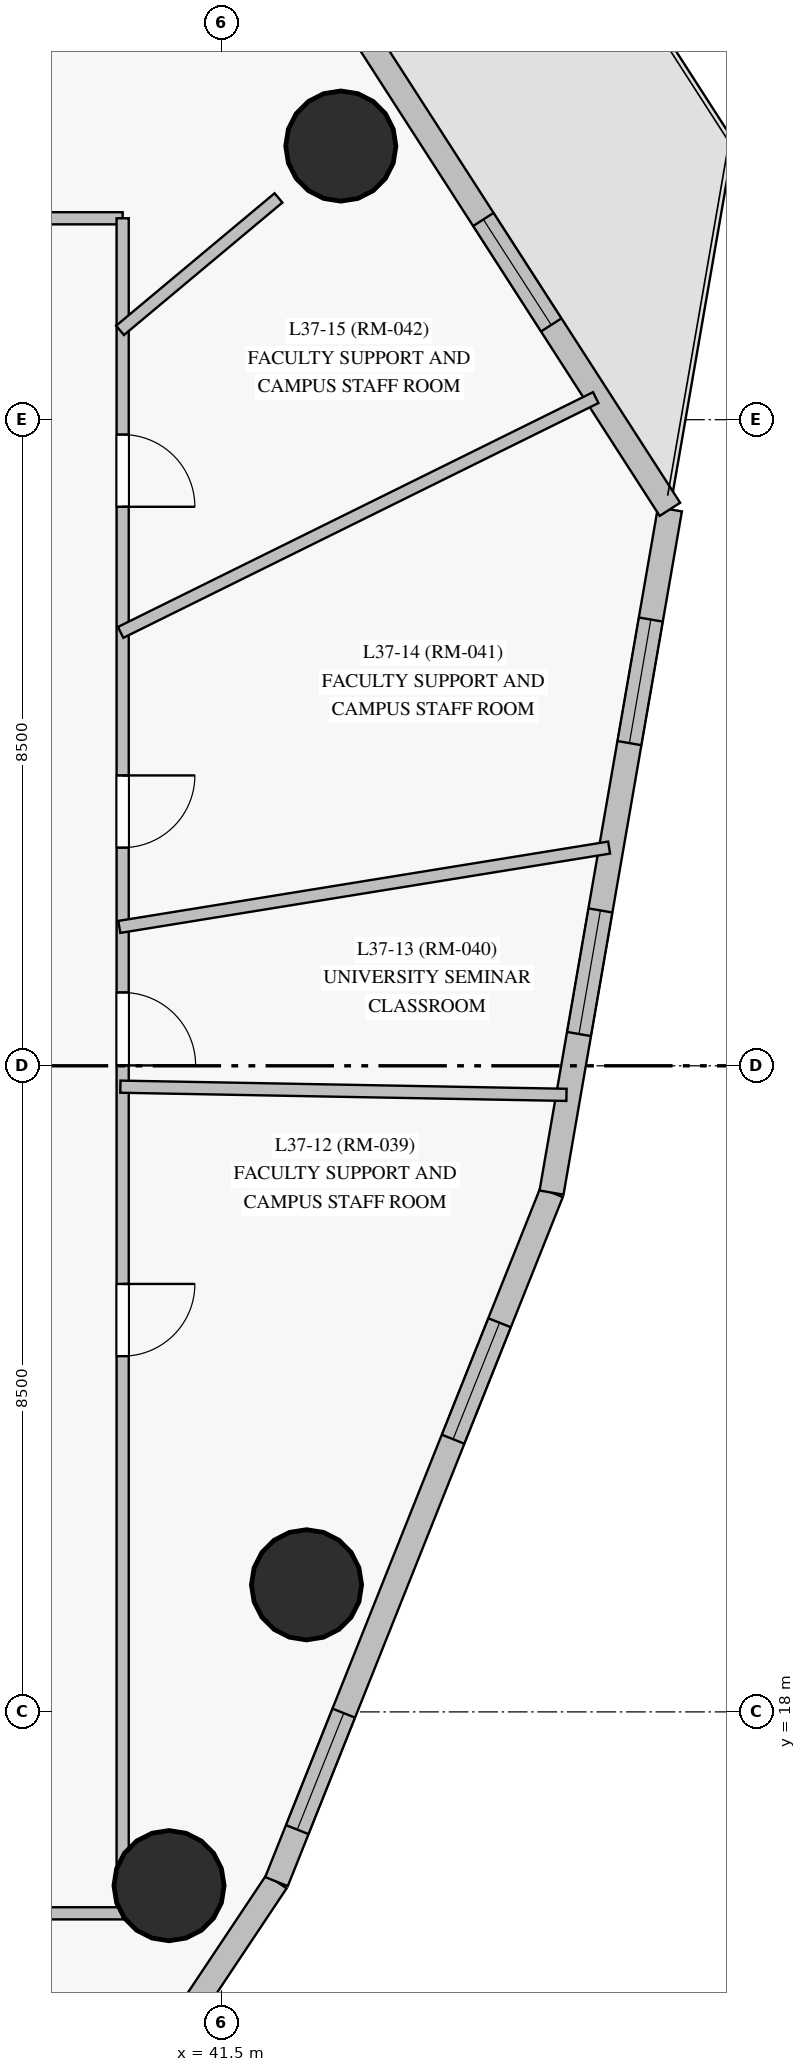
"""IFC4 building model, lengths in metres.
Left out: names, types, materials, properties, quantities, classifications, styles, units other than length and angle.
Written with IfcOpenShell. Run it as: python <this file> out.ifc"""

import sys

from ifc_helpers import new_model, si_unit, direction, frame, frame_2d, origin, origin_with_axes, origin_2d, place, context, subcontext, project, spatial, rectangle, circle, extrude, source, transform, mapped, element, fill, save


model = new_model("IFC4")
c1 = context("Model", 3, precision=1e-05, world=origin(), true_north=direction((0.0, 1.0)))
c2 = subcontext(c1, "Body", "Model", "MODEL_VIEW")
j1 = project(units=[si_unit("LENGTHUNIT", "METRE"), si_unit("PLANEANGLEUNIT", "RADIAN")], contexts=[c1])
p1 = place(None, origin())
s1 = spatial("IfcSite", under=j1, at=p1, CompositionType="ELEMENT")
p2 = place(p1, origin())
s2 = spatial("IfcBuilding", under=s1, at=p2, CompositionType="ELEMENT")
p3 = place(p2, frame((0.0, 0.0, 132.8)))
s3 = spatial("IfcBuildingStorey", under=s2, at=p3, CompositionType="ELEMENT", Elevation=132.8)
m1 = source(origin_with_axes(), c2, "Body", "SweptSolid", [
    extrude(circle(Radius=0.725, at=origin_2d()), origin(), (0.0, 0.0, 1.0), 3.05),
])
for number, where, z_axis, x_axis in (
    (1, (42.619, 19.672, 0.0), (0.0, 0.0, 1.0), (1.0, 0.0, 0.0)),
    (2, (43.07, 38.6, 0.0), (0.0, 0.0, 1.0), (1.0, 0.0, 0.0)),
    (3, (40.81, 15.714, 0.0), (0.0, 0.0, 1.0), (1.0, 0.0, 0.0)),
):
    element("IfcColumn", number, at=place(p3, frame(where, z_axis=z_axis, x_axis=x_axis)), inside=s3, PredefinedType="COLUMN", context=c2, shape_type="MappedRepresentation", body=[
        mapped(m1, transform((0.0, 0.0, 0.0), scale=1.0)),
    ])
p4 = place(p3, frame((34.435, 4.083, 0.0), z_axis=(0.0, 0.0, 1.0), x_axis=(0.554696184095, 0.832052969077, 0.0)))
e4 = element("IfcWall", 4, at=p4, inside=s3, PredefinedType="SOLIDWALL", context=c2, shape_type="SweptSolid", body=[
    extrude(rectangle(XDim=14.042, YDim=0.32, at=frame_2d((7.021, 0.0))), origin(), (0.0, 0.0, 1.0), 2.825),
])
p5 = place(p4, frame((0.599, 0.0, 0.85)))
e5 = element("IfcOpeningElement", 5, at=p5, cuts=e4, PredefinedType="OPENING", context=c2, shape_type="SweptSolid", body=[
    extrude(rectangle(XDim=1.65, YDim=1.65, at=frame_2d((0.825, 0.825))), frame((0.0, 0.17, 0.0), z_axis=(0.0, -1.0, 0.0), x_axis=(1.0, 0.0, 0.0)), (0.0, 0.0, 1.0), 0.34),
])
p6 = place(p4, frame((3.502, 0.0, 0.85)))
e6 = element("IfcOpeningElement", 6, at=p6, cuts=e4, PredefinedType="OPENING", context=c2, shape_type="SweptSolid", body=[
    extrude(rectangle(XDim=1.65, YDim=1.65, at=frame_2d((0.825, 0.825))), frame((0.0, 0.17, 0.0), z_axis=(0.0, -1.0, 0.0), x_axis=(1.0, 0.0, 0.0)), (0.0, 0.0, 1.0), 0.34),
])
p7 = place(p4, frame((8.36, 0.0, 0.85)))
e7 = element("IfcOpeningElement", 7, at=p7, cuts=e4, PredefinedType="OPENING", context=c2, shape_type="SweptSolid", body=[
    extrude(rectangle(XDim=1.65, YDim=1.65, at=frame_2d((0.825, 0.825))), frame((0.0, 0.17, 0.0), z_axis=(0.0, -1.0, 0.0), x_axis=(1.0, 0.0, 0.0)), (0.0, 0.0, 1.0), 0.34),
])
p8 = place(p3, frame((42.224, 15.767, 0.0), z_axis=(0.0, 0.0, 1.0), x_axis=(0.37072212122, 0.928743833809, 0.0)))
e8 = element("IfcWall", 8, at=p8, inside=s3, PredefinedType="SOLIDWALL", context=c2, shape_type="SweptSolid", body=[
    extrude(rectangle(XDim=9.76, YDim=0.32, at=frame_2d((4.88, 0.0))), origin(), (0.0, 0.0, 1.0), 2.825),
])
p9 = place(p8, frame((0.737, 0.0, 0.85)))
e9 = element("IfcOpeningElement", 9, at=p9, cuts=e8, PredefinedType="OPENING", context=c2, shape_type="SweptSolid", body=[
    extrude(rectangle(XDim=1.65, YDim=1.65, at=frame_2d((0.825, 0.825))), frame((0.0, 0.17, 0.0), z_axis=(0.0, -1.0, 0.0), x_axis=(1.0, 0.0, 0.0)), (0.0, 0.0, 1.0), 0.34),
])
p10 = place(p8, frame((6.267, 0.0, 0.85)))
e10 = element("IfcOpeningElement", 10, at=p10, cuts=e8, PredefinedType="OPENING", context=c2, shape_type="SweptSolid", body=[
    extrude(rectangle(XDim=1.65, YDim=1.65, at=frame_2d((0.825, 0.825))), frame((0.0, 0.17, 0.0), z_axis=(0.0, -1.0, 0.0), x_axis=(1.0, 0.0, 0.0)), (0.0, 0.0, 1.0), 0.34),
])
p11 = place(p3, frame((45.842, 24.832, 0.0), z_axis=(0.0, 0.0, 1.0), x_axis=(0.170718823462, 0.985319787336, 0.0)))
e11 = element("IfcWall", 11, at=p11, inside=s3, PredefinedType="SOLIDWALL", context=c2, shape_type="SweptSolid", body=[
    extrude(rectangle(XDim=9.123, YDim=0.32, at=frame_2d((4.561, 0.0))), origin(), (0.0, 0.0, 1.0), 2.825),
])
p12 = place(p11, frame((2.117, 0.0, 0.85)))
e12 = element("IfcOpeningElement", 12, at=p12, cuts=e11, PredefinedType="OPENING", context=c2, shape_type="SweptSolid", body=[
    extrude(rectangle(XDim=1.65, YDim=1.65, at=frame_2d((0.825, 0.825))), frame((0.0, 0.17, 0.0), z_axis=(0.0, -1.0, 0.0), x_axis=(1.0, 0.0, 0.0)), (0.0, 0.0, 1.0), 0.34),
])
p13 = place(p11, frame((6.001, 0.0, 0.85)))
e13 = element("IfcOpeningElement", 13, at=p13, cuts=e11, PredefinedType="OPENING", context=c2, shape_type="SweptSolid", body=[
    extrude(rectangle(XDim=1.65, YDim=1.65, at=frame_2d((0.825, 0.825))), frame((0.0, 0.17, 0.0), z_axis=(0.0, -1.0, 0.0), x_axis=(1.0, 0.0, 0.0)), (0.0, 0.0, 1.0), 0.34),
])
p14 = place(p3, frame((47.4, 33.821, 0.0), z_axis=(0.0, 0.0, 1.0), x_axis=(-0.541180462956, 0.840906479054, 0.0)))
e14 = element("IfcWall", 14, at=p14, inside=s3, PredefinedType="SOLIDWALL", context=c2, shape_type="SweptSolid", body=[
    extrude(rectangle(XDim=16.776, YDim=0.32, at=frame_2d((8.388, 0.0))), origin(), (0.0, 0.0, 1.0), 2.825),
])
p15 = place(p14, frame((2.885, 0.0, 0.85)))
e15 = element("IfcOpeningElement", 15, at=p15, cuts=e14, PredefinedType="OPENING", context=c2, shape_type="SweptSolid", body=[
    extrude(rectangle(XDim=1.65, YDim=1.65, at=frame_2d((0.825, 0.825))), frame((0.0, 0.17, 0.0), z_axis=(0.0, -1.0, 0.0), x_axis=(1.0, 0.0, 0.0)), (0.0, 0.0, 1.0), 0.34),
])
p16 = place(p14, frame((14.756, 0.0, 0.85)))
e16 = element("IfcOpeningElement", 16, at=p16, cuts=e14, PredefinedType="OPENING", context=c2, shape_type="SweptSolid", body=[
    extrude(rectangle(XDim=1.4, YDim=1.65, at=frame_2d((0.7, 0.825))), frame((0.0, 0.17, 0.0), z_axis=(0.0, -1.0, 0.0), x_axis=(1.0, 0.0, 0.0)), (0.0, 0.0, 1.0), 0.34),
])
p17 = place(p14, frame((10.659, 0.0, 0.0)))
e17 = element("IfcOpeningElement", 17, at=p17, cuts=e14, PredefinedType="OPENING", context=c2, shape_type="SweptSolid", body=[
    extrude(rectangle(XDim=1.05, YDim=2.12, at=frame_2d((0.525, 1.06))), frame((0.0, 0.17, 0.0), z_axis=(0.0, -1.0, 0.0), x_axis=(1.0, 0.0, 0.0)), (0.0, 0.0, 1.0), 0.34),
])
p18 = place(p3, frame((16.7, 37.65, 0.0), z_axis=(0.0, 0.0, 1.0), x_axis=(1.0, 0.0, 0.0)))
e18 = element("IfcWall", 18, at=p18, inside=s3, PredefinedType="PARTITIONING", context=c2, shape_type="SweptSolid", body=[
    extrude(rectangle(XDim=23.5, YDim=0.16, at=frame_2d((11.75, 0.0))), origin(), (0.0, 0.0, 1.0), 2.325),
])
p19 = place(p18, frame((20.49, 0.0, 0.0)))
e19 = element("IfcOpeningElement", 19, at=p19, cuts=e18, PredefinedType="OPENING", context=c2, shape_type="SweptSolid", body=[
    extrude(rectangle(XDim=0.96, YDim=2.15, at=frame_2d((0.48, 1.075))), frame((0.0, 0.09, 0.0), z_axis=(0.0, -1.0, 0.0), x_axis=(1.0, 0.0, 0.0)), (0.0, 0.0, 1.0), 0.18),
])
p20 = place(p18, frame((17.11, 0.0, 0.0)))
e20 = element("IfcOpeningElement", 20, at=p20, cuts=e18, PredefinedType="OPENING", context=c2, shape_type="SweptSolid", body=[
    extrude(rectangle(XDim=0.95, YDim=2.15, at=frame_2d((0.475, 1.075))), frame((0.0, 0.09, 0.0), z_axis=(0.0, -1.0, 0.0), x_axis=(1.0, 0.0, 0.0)), (0.0, 0.0, 1.0), 0.18),
])
p21 = place(p18, frame((14.71, 0.0, 0.0)))
e21 = element("IfcOpeningElement", 21, at=p21, cuts=e18, PredefinedType="OPENING", context=c2, shape_type="SweptSolid", body=[
    extrude(rectangle(XDim=0.96, YDim=2.15, at=frame_2d((0.48, 1.075))), frame((0.0, 0.09, 0.0), z_axis=(0.0, -1.0, 0.0), x_axis=(1.0, 0.0, 0.0)), (0.0, 0.0, 1.0), 0.18),
])
p22 = place(p18, frame((10.785, 0.0, 0.0)))
e22 = element("IfcOpeningElement", 22, at=p22, cuts=e18, PredefinedType="OPENING", context=c2, shape_type="SweptSolid", body=[
    extrude(rectangle(XDim=0.95, YDim=2.15, at=frame_2d((0.475, 1.075))), frame((0.0, 0.09, 0.0), z_axis=(0.0, -1.0, 0.0), x_axis=(1.0, 0.0, 0.0)), (0.0, 0.0, 1.0), 0.18),
])
p23 = place(p18, frame((7.75, 0.0, 0.0)))
e23 = element("IfcOpeningElement", 23, at=p23, cuts=e18, PredefinedType="OPENING", context=c2, shape_type="SweptSolid", body=[
    extrude(rectangle(XDim=0.95, YDim=2.15, at=frame_2d((0.475, 1.075))), frame((0.0, 0.09, 0.0), z_axis=(0.0, -1.0, 0.0), x_axis=(1.0, 0.0, 0.0)), (0.0, 0.0, 1.0), 0.18),
])
p24 = place(p3, frame((40.2, 37.65, 0.0), z_axis=(0.0, 0.0, 1.0), x_axis=(0.0, -1.0, 0.0)))
e24 = element("IfcWall", 24, at=p24, inside=s3, PredefinedType="PARTITIONING", context=c2, shape_type="SweptSolid", body=[
    extrude(rectangle(XDim=22.3, YDim=0.16, at=frame_2d((11.15, 0.0))), origin(), (0.0, 0.0, 1.0), 2.325),
])
p25 = place(p24, frame((14.02, 0.0, 0.0)))
e25 = element("IfcOpeningElement", 25, at=p25, cuts=e24, PredefinedType="OPENING", context=c2, shape_type="SweptSolid", body=[
    extrude(rectangle(XDim=0.95, YDim=2.15, at=frame_2d((0.475, 1.075))), frame((0.0, 0.09, 0.0), z_axis=(0.0, -1.0, 0.0), x_axis=(1.0, 0.0, 0.0)), (0.0, 0.0, 1.0), 0.18),
])
p26 = place(p24, frame((10.185, 0.0, 0.0)))
e26 = element("IfcOpeningElement", 26, at=p26, cuts=e24, PredefinedType="OPENING", context=c2, shape_type="SweptSolid", body=[
    extrude(rectangle(XDim=0.96, YDim=2.15, at=frame_2d((0.48, 1.075))), frame((0.0, 0.09, 0.0), z_axis=(0.0, -1.0, 0.0), x_axis=(1.0, 0.0, 0.0)), (0.0, 0.0, 1.0), 0.18),
])
p27 = place(p24, frame((7.33, 0.0, 0.0)))
e27 = element("IfcOpeningElement", 27, at=p27, cuts=e24, PredefinedType="OPENING", context=c2, shape_type="SweptSolid", body=[
    extrude(rectangle(XDim=0.95, YDim=2.15, at=frame_2d((0.475, 1.075))), frame((0.0, 0.09, 0.0), z_axis=(0.0, -1.0, 0.0), x_axis=(1.0, 0.0, 0.0)), (0.0, 0.0, 1.0), 0.18),
])
p28 = place(p24, frame((2.846, 0.0, 0.0)))
e28 = element("IfcOpeningElement", 28, at=p28, cuts=e24, PredefinedType="OPENING", context=c2, shape_type="SweptSolid", body=[
    extrude(rectangle(XDim=0.95, YDim=2.15, at=frame_2d((0.475, 1.075))), frame((0.0, 0.09, 0.0), z_axis=(0.0, -1.0, 0.0), x_axis=(1.0, 0.0, 0.0)), (0.0, 0.0, 1.0), 0.18),
])
p29 = place(p3, frame((40.2, 15.35, 0.0), z_axis=(0.0, 0.0, 1.0), x_axis=(-1.0, 0.0, 0.0)))
e29 = element("IfcWall", 29, at=p29, inside=s3, PredefinedType="PARTITIONING", context=c2, shape_type="SweptSolid", body=[
    extrude(rectangle(XDim=10.65, YDim=0.16, at=frame_2d((5.325, 0.0))), origin(), (0.0, 0.0, 1.0), 2.225),
])
p30 = place(p29, frame((7.853, 0.0, 0.0)))
e30 = element("IfcOpeningElement", 30, at=p30, cuts=e29, PredefinedType="OPENING", context=c2, shape_type="SweptSolid", body=[
    extrude(rectangle(XDim=0.95, YDim=2.15, at=frame_2d((0.475, 1.075))), frame((0.0, 0.09, 0.0), z_axis=(0.0, -1.0, 0.0), x_axis=(1.0, 0.0, 0.0)), (0.0, 0.0, 1.0), 0.18),
])
p31 = place(p29, frame((6.308, 0.0, 0.0)))
e31 = element("IfcOpeningElement", 31, at=p31, cuts=e29, PredefinedType="OPENING", context=c2, shape_type="SweptSolid", body=[
    extrude(rectangle(XDim=0.96, YDim=2.15, at=frame_2d((0.48, 1.075))), frame((0.0, 0.09, 0.0), z_axis=(0.0, -1.0, 0.0), x_axis=(1.0, 0.0, 0.0)), (0.0, 0.0, 1.0), 0.18),
])
p32 = place(p29, frame((4.46, 0.0, 0.0)))
e32 = element("IfcOpeningElement", 32, at=p32, cuts=e29, PredefinedType="OPENING", context=c2, shape_type="SweptSolid", body=[
    extrude(rectangle(XDim=0.95, YDim=2.15, at=frame_2d((0.475, 1.075))), frame((0.0, 0.09, 0.0), z_axis=(0.0, -1.0, 0.0), x_axis=(1.0, 0.0, 0.0)), (0.0, 0.0, 1.0), 0.18),
])
p33 = place(p3, frame((34.982, 37.611, 0.0), z_axis=(0.0, 0.0, 1.0), x_axis=(0.499853576741, 0.86610992479, 0.0)))
e33 = element("IfcWall", 33, at=p33, inside=s3, PredefinedType="PARTITIONING", context=c2, shape_type="SweptSolid", body=[
    extrude(rectangle(XDim=9.402, YDim=0.16, at=frame_2d((4.701, 0.0))), origin(), (0.0, 0.0, 1.0), 2.825),
])
p34 = place(p3, frame((40.173, 32.202, 0.0), z_axis=(0.0, 0.0, 1.0), x_axis=(0.896518370802, 0.443006558433, 0.0)))
e34 = element("IfcWall", 34, at=p34, inside=s3, PredefinedType="PARTITIONING", context=c2, shape_type="SweptSolid", body=[
    extrude(rectangle(XDim=6.972, YDim=0.16, at=frame_2d((3.486, 0.0))), origin(), (0.0, 0.0, 1.0), 2.825),
])
p35 = place(p3, frame((40.156, 28.327, 0.0), z_axis=(0.0, 0.0, 1.0), x_axis=(0.987137558306, 0.159873202825, 0.0)))
e35 = element("IfcWall", 35, at=p35, inside=s3, PredefinedType="PARTITIONING", context=c2, shape_type="SweptSolid", body=[
    extrude(rectangle(XDim=6.528, YDim=0.16, at=frame_2d((3.264, 0.0))), origin(), (0.0, 0.0, 1.0), 2.825),
])
p36 = place(p3, frame((40.17, 26.225, 0.0), z_axis=(0.0, 0.0, 1.0), x_axis=(0.999831769481, -0.018342102847, 0.0)))
e36 = element("IfcWall", 36, at=p36, inside=s3, PredefinedType="PARTITIONING", context=c2, shape_type="SweptSolid", body=[
    extrude(rectangle(XDim=5.87, YDim=0.16, at=frame_2d((2.935, 0.0))), origin(), (0.0, 0.0, 1.0), 2.825),
])
p37 = place(p3, frame((40.166, 36.175, 0.0), z_axis=(0.0, 0.0, 1.0), x_axis=(0.767203889696, 0.641403298741, 0.0)))
e37 = element("IfcWall", 37, at=p37, inside=s3, PredefinedType="PARTITIONING", context=c2, shape_type="SweptSolid", body=[
    extrude(rectangle(XDim=2.717, YDim=0.16, at=frame_2d((1.358, 0.0))), origin(), (0.0, 0.0, 1.0), 2.225),
])
m2 = source(origin_with_axes(), c2, "Body", "SweptSolid", [
    extrude(rectangle(XDim=1.65, YDim=1.65, at=frame_2d((0.825, 0.825))), frame((0.0, 0.03, 0.0), z_axis=(0.0, -1.0, 0.0), x_axis=(1.0, 0.0, 0.0)), (0.0, 0.0, 1.0), 0.06),
])
p38 = place(p9, origin())
e38 = element("IfcWindow", 38, at=p38, inside=s3, PartitioningType="SINGLE_PANEL", PredefinedType="WINDOW", context=c2, shape_type="MappedRepresentation", body=[
    mapped(m2, transform((0.0, 0.0, 0.0), scale=1.0)),
])
fill(e9, e38)
p39 = place(p10, origin())
e39 = element("IfcWindow", 39, at=p39, inside=s3, PartitioningType="SINGLE_PANEL", PredefinedType="WINDOW", context=c2, shape_type="MappedRepresentation", body=[
    mapped(m2, transform((0.0, 0.0, 0.0), scale=1.0)),
])
fill(e10, e39)
p40 = place(p12, origin())
e40 = element("IfcWindow", 40, at=p40, inside=s3, PartitioningType="SINGLE_PANEL", PredefinedType="WINDOW", context=c2, shape_type="MappedRepresentation", body=[
    mapped(m2, transform((0.0, 0.0, 0.0), scale=1.0)),
])
fill(e12, e40)
p41 = place(p13, origin())
e41 = element("IfcWindow", 41, at=p41, inside=s3, PartitioningType="SINGLE_PANEL", PredefinedType="WINDOW", context=c2, shape_type="MappedRepresentation", body=[
    mapped(m2, transform((0.0, 0.0, 0.0), scale=1.0)),
])
fill(e13, e41)
p42 = place(p15, origin())
e42 = element("IfcWindow", 42, at=p42, inside=s3, PartitioningType="SINGLE_PANEL", PredefinedType="WINDOW", context=c2, shape_type="MappedRepresentation", body=[
    mapped(m2, transform((0.0, 0.0, 0.0), scale=1.0)),
])
fill(e15, e42)
m3 = source(origin_with_axes(), c2, "Body", "SweptSolid", [
    extrude(rectangle(XDim=0.95, YDim=2.15, at=frame_2d((0.475, 1.075))), frame((0.0, 0.025, 0.0), z_axis=(0.0, -1.0, 0.0), x_axis=(1.0, 0.0, 0.0)), (0.0, 0.0, 1.0), 0.05),
])
p43 = place(p25, origin())
e43 = element("IfcDoor", 43, at=p43, inside=s3, OperationType="SINGLE_SWING_LEFT", PredefinedType="DOOR", context=c2, shape_type="MappedRepresentation", body=[
    mapped(m3, transform((0.0, 0.0, 0.0), scale=1.0)),
])
fill(e25, e43)
m4 = source(origin_with_axes(), c2, "Body", "SweptSolid", [
    extrude(rectangle(XDim=0.96, YDim=2.15, at=frame_2d((0.48, 1.075))), frame((0.0, 0.025, 0.0), z_axis=(0.0, -1.0, 0.0), x_axis=(1.0, 0.0, 0.0)), (0.0, 0.0, 1.0), 0.05),
])
p44 = place(p26, origin())
e44 = element("IfcDoor", 44, at=p44, inside=s3, OperationType="SINGLE_SWING_RIGHT", PredefinedType="DOOR", context=c2, shape_type="MappedRepresentation", body=[
    mapped(m4, transform((0.0, 0.0, 0.0), scale=1.0)),
])
fill(e26, e44)
p45 = place(p27, origin())
e45 = element("IfcDoor", 45, at=p45, inside=s3, OperationType="SINGLE_SWING_LEFT", PredefinedType="DOOR", context=c2, shape_type="MappedRepresentation", body=[
    mapped(m3, transform((0.0, 0.0, 0.0), scale=1.0)),
])
fill(e27, e45)
p46 = place(p28, origin())
e46 = element("IfcDoor", 46, at=p46, inside=s3, OperationType="SINGLE_SWING_RIGHT", PredefinedType="DOOR", context=c2, shape_type="MappedRepresentation", body=[
    mapped(m3, transform((0.0, 0.0, 0.0), scale=1.0)),
])
fill(e28, e46)
save(model, sys.argv[1])
